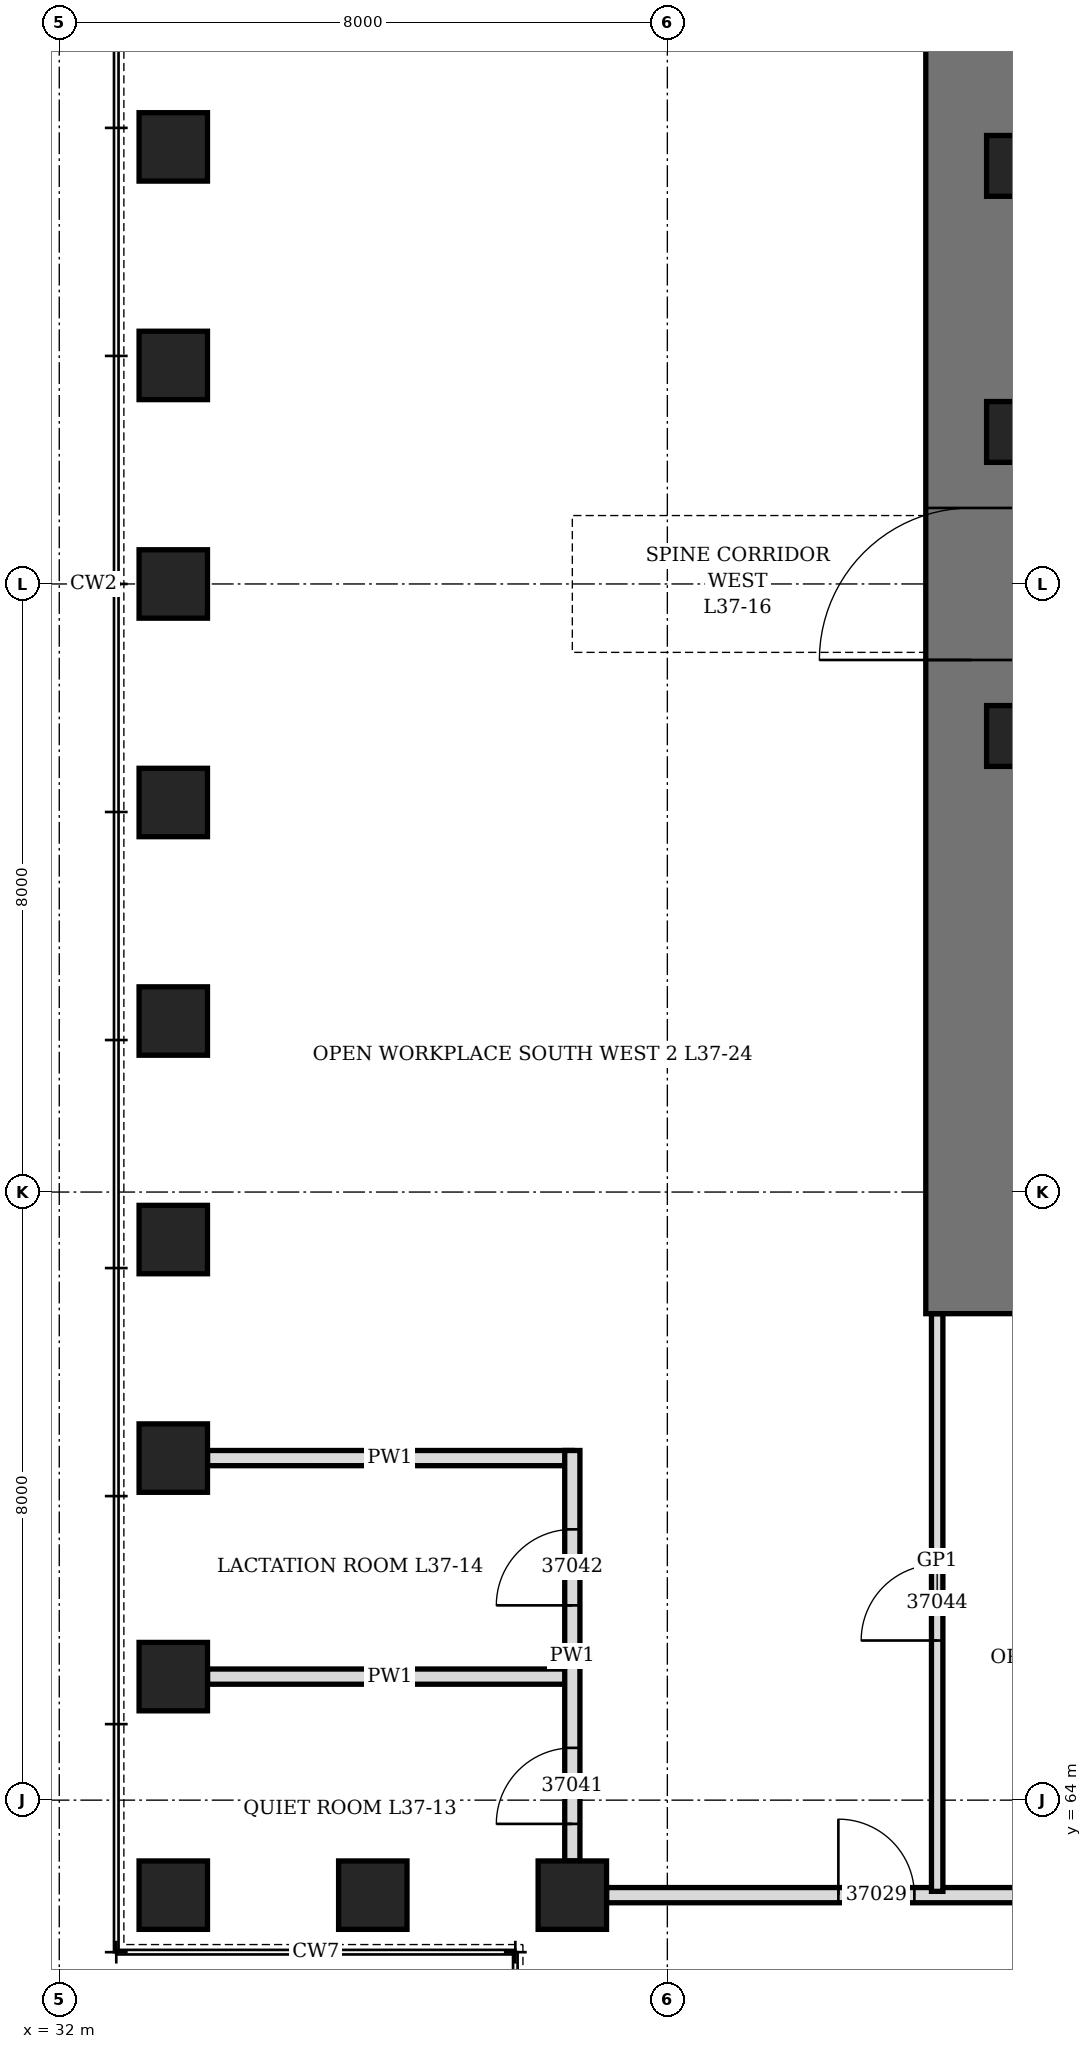
"""IFC4 building model, lengths in metres.
Left out: names, types, materials, properties, quantities, classifications, styles, units other than length and angle.
Written with IfcOpenShell. Run it as: python <this file> out.ifc"""

import sys

from ifc_helpers import new_model, si_unit, direction, frame, frame_2d, origin, origin_2d, place, context, subcontext, project, spatial, rectangle, hollow_rectangle, extrude, element, fill, save


model = new_model("IFC4")
c1 = context("Model", 3, precision=1e-05, world=origin(), true_north=direction((0.0, 1.0)))
c2 = subcontext(c1, "Body", "Model", "MODEL_VIEW")
j1 = project(units=[si_unit("LENGTHUNIT", "METRE"), si_unit("PLANEANGLEUNIT", "RADIAN")], contexts=[c1])
p1 = place(None, origin())
s1 = spatial("IfcSite", under=j1, at=p1, CompositionType="ELEMENT")
p2 = place(p1, origin())
s2 = spatial("IfcBuilding", under=s1, at=p2, CompositionType="ELEMENT")
p3 = place(p2, frame((0.0, 0.0, 166.9)))
s3 = spatial("IfcBuildingStorey", under=s2, at=p3, CompositionType="ELEMENT", Elevation=166.9)
for number, where, z_axis, x_axis in (
    (1, (33.5, 85.75, 0.0), (0.0, 0.0, 1.0), (0.0, 1.0, 0.0)),
    (2, (33.5, 82.875, 0.0), (0.0, 0.0, 1.0), (0.0, 1.0, 0.0)),
    (3, (33.5, 80.0, 0.0), (0.0, 0.0, 1.0), (0.0, 1.0, 0.0)),
    (4, (33.5, 77.125, 0.0), (0.0, 0.0, 1.0), (0.0, 1.0, 0.0)),
    (5, (33.5, 74.25, 0.0), (0.0, 0.0, 1.0), (0.0, 1.0, 0.0)),
    (6, (33.5, 71.375, 0.0), (0.0, 0.0, 1.0), (0.0, 1.0, 0.0)),
    (7, (33.5, 68.5, 0.0), (0.0, 0.0, 1.0), (0.0, 1.0, 0.0)),
    (8, (33.5, 65.625, 0.0), (0.0, 0.0, 1.0), (0.0, 1.0, 0.0)),
    (9, (33.5, 62.75, 0.0), (0.0, 0.0, 1.0), (1.0, 0.0, 0.0)),
    (10, (36.125, 62.75, 0.0), (0.0, 0.0, 1.0), (1.0, 0.0, 0.0)),
    (11, (38.75, 62.75, 0.0), (0.0, 0.0, 1.0), (0.0, 1.0, 0.0)),
):
    element("IfcColumn", number, at=place(p3, frame(where, z_axis=z_axis, x_axis=x_axis)), inside=s3, PredefinedType="COLUMN", context=c2, shape_type="SweptSolid", body=[
        extrude(hollow_rectangle(XDim=0.9, YDim=0.9, WallThickness=0.12, at=origin_2d()), origin(), (0.0, 0.0, 1.0), 4.2),
    ])
p4 = place(p3, frame((44.0, 70.4, 0.0), z_axis=(0.0, 0.0, 1.0), x_axis=(0.0, 1.0, 0.0)))
e12 = element("IfcWall", 12, at=p4, inside=s3, PredefinedType="SHEAR", context=c2, shape_type="SweptSolid", body=[
    extrude(rectangle(XDim=19.2, YDim=1.2, at=frame_2d((9.6, 0.0))), origin(), (0.0, 0.0, 1.0), 4.2),
])
p5 = place(p4, frame((8.6, 0.0, 0.0)))
e13 = element("IfcOpeningElement", 13, at=p5, cuts=e12, PredefinedType="OPENING", context=c2, shape_type="SweptSolid", body=[
    extrude(rectangle(XDim=2.0, YDim=2.4, at=frame_2d((1.0, 1.2))), frame((0.0, 0.61, 0.0), z_axis=(0.0, -1.0, 0.0), x_axis=(1.0, 0.0, 0.0)), (0.0, 0.0, 1.0), 1.22),
])
for number, where, z_axis, x_axis in (
    (14, (44.6, 78.0, 0.0), (0.0, 0.0, 1.0), (1.0, 0.0, 0.0)),
    (15, (44.6, 82.0, 0.0), (0.0, 0.0, 1.0), (1.0, 0.0, 0.0)),
    (16, (44.6, 85.5, 0.0), (0.0, 0.0, 1.0), (1.0, 0.0, 0.0)),
):
    element("IfcColumn", number, at=place(p3, frame(where, z_axis=z_axis, x_axis=x_axis)), inside=s3, PredefinedType="COLUMN", context=c2, shape_type="SweptSolid", body=[
        extrude(hollow_rectangle(XDim=0.8, YDim=0.8, WallThickness=0.1, at=origin_2d()), origin(), (0.0, 0.0, 1.0), 4.2),
    ])
for number, where, z_axis, x_axis in (
    (17, (33.95, 65.625, 0.0), (0.0, 0.0, 1.0), (1.0, 0.0, 0.0)),
    (18, (33.95, 68.5, 0.0), (0.0, 0.0, 1.0), (1.0, 0.0, 0.0)),
):
    element("IfcWall", number, at=place(p3, frame(where, z_axis=z_axis, x_axis=x_axis)), inside=s3, PredefinedType="PARTITIONING", context=c2, shape_type="SweptSolid", body=[
        extrude(rectangle(XDim=4.8, YDim=0.2, at=frame_2d((2.4, 0.0))), origin(), (0.0, 0.0, 1.0), 3.428),
    ])
p6 = place(p3, frame((39.2, 62.75, 0.0), z_axis=(0.0, 0.0, 1.0), x_axis=(1.0, 0.0, 0.0)))
e19 = element("IfcWall", 19, at=p6, inside=s3, PredefinedType="PARTITIONING", context=c2, shape_type="SweptSolid", body=[
    extrude(rectangle(XDim=25.525, YDim=0.2, at=frame_2d((12.763, 0.0))), origin(), (0.0, 0.0, 1.0), 4.04),
])
p7 = place(p6, frame((3.05, 0.0, 0.0)))
e20 = element("IfcOpeningElement", 20, at=p7, cuts=e19, PredefinedType="OPENING", context=c2, shape_type="SweptSolid", body=[
    extrude(rectangle(XDim=1.0, YDim=2.1, at=frame_2d((0.5, 1.05))), frame((0.0, 0.11, 0.0), z_axis=(0.0, -1.0, 0.0), x_axis=(1.0, 0.0, 0.0)), (0.0, 0.0, 1.0), 0.22),
])
p8 = place(p6, frame((11.988, 0.0, 0.0)))
e21 = element("IfcOpeningElement", 21, at=p8, cuts=e19, PredefinedType="OPENING", context=c2, shape_type="SweptSolid", body=[
    extrude(rectangle(XDim=1.0, YDim=2.1, at=frame_2d((0.5, 1.05))), frame((0.0, 0.11, 0.0), z_axis=(0.0, -1.0, 0.0), x_axis=(1.0, 0.0, 0.0)), (0.0, 0.0, 1.0), 0.22),
])
p9 = place(p6, frame((20.613, 0.0, 0.0)))
e22 = element("IfcOpeningElement", 22, at=p9, cuts=e19, PredefinedType="OPENING", context=c2, shape_type="SweptSolid", body=[
    extrude(rectangle(XDim=1.0, YDim=2.1, at=frame_2d((0.5, 1.05))), frame((0.0, 0.11, 0.0), z_axis=(0.0, -1.0, 0.0), x_axis=(1.0, 0.0, 0.0)), (0.0, 0.0, 1.0), 0.22),
])
p10 = place(p3, frame((38.75, 63.2, 0.0), z_axis=(0.0, 0.0, 1.0), x_axis=(0.0, 1.0, 0.0)))
e23 = element("IfcWall", 23, at=p10, inside=s3, PredefinedType="PARTITIONING", context=c2, shape_type="SweptSolid", body=[
    extrude(rectangle(XDim=5.4, YDim=0.2, at=frame_2d((2.7, 0.0))), origin(), (0.0, 0.0, 1.0), 4.04),
])
p11 = place(p10, frame((0.488, 0.0, 0.0)))
e24 = element("IfcOpeningElement", 24, at=p11, cuts=e23, PredefinedType="OPENING", context=c2, shape_type="SweptSolid", body=[
    extrude(rectangle(XDim=1.0, YDim=2.1, at=frame_2d((0.5, 1.05))), frame((0.0, 0.11, 0.0), z_axis=(0.0, -1.0, 0.0), x_axis=(1.0, 0.0, 0.0)), (0.0, 0.0, 1.0), 0.22),
])
p12 = place(p10, frame((3.363, 0.0, 0.0)))
e25 = element("IfcOpeningElement", 25, at=p12, cuts=e23, PredefinedType="OPENING", context=c2, shape_type="SweptSolid", body=[
    extrude(rectangle(XDim=1.0, YDim=2.1, at=frame_2d((0.5, 1.05))), frame((0.0, 0.11, 0.0), z_axis=(0.0, -1.0, 0.0), x_axis=(1.0, 0.0, 0.0)), (0.0, 0.0, 1.0), 0.22),
])
p13 = place(p3, frame((43.55, 62.8, 0.0), z_axis=(0.0, 0.0, 1.0), x_axis=(0.0, 1.0, 0.0)))
e26 = element("IfcWall", 26, at=p13, inside=s3, PredefinedType="PARTITIONING", context=c2, shape_type="SweptSolid", body=[
    extrude(rectangle(XDim=7.6, YDim=0.15, at=frame_2d((3.8, 0.0))), origin(), (0.0, 0.0, 1.0), 4.04),
])
p14 = place(p13, frame((3.3, 0.0, 0.0)))
e27 = element("IfcOpeningElement", 27, at=p14, cuts=e26, PredefinedType="OPENING", context=c2, shape_type="SweptSolid", body=[
    extrude(rectangle(XDim=1.0, YDim=2.4, at=frame_2d((0.5, 1.2))), frame((0.0, 0.085, 0.0), z_axis=(0.0, -1.0, 0.0), x_axis=(1.0, 0.0, 0.0)), (0.0, 0.0, 1.0), 0.17),
])
p15 = place(p5, origin())
e28 = element("IfcDoor", 28, at=p15, inside=s3, OperationType="DOUBLE_DOOR_SINGLE_SWING", PredefinedType="DOOR", context=c2, shape_type="SweptSolid", body=[
    extrude(rectangle(XDim=2.0, YDim=2.4, at=frame_2d((1.0, 1.2))), frame((0.0, 0.35, 0.0), z_axis=(0.0, -1.0, 0.0), x_axis=(1.0, 0.0, 0.0)), (0.0, 0.0, 1.0), 0.7),
])
fill(e13, e28)
p16 = place(p7, origin())
e29 = element("IfcDoor", 29, at=p16, inside=s3, OperationType="SINGLE_SWING_LEFT", PredefinedType="DOOR", context=c2, shape_type="SweptSolid", body=[
    extrude(rectangle(XDim=1.0, YDim=2.1, at=frame_2d((0.5, 1.05))), frame((0.0, 0.1, 0.0), z_axis=(0.0, -1.0, 0.0), x_axis=(1.0, 0.0, 0.0)), (0.0, 0.0, 1.0), 0.199),
])
fill(e20, e29)
p17 = place(p11, origin())
e30 = element("IfcDoor", 30, at=p17, inside=s3, OperationType="SINGLE_SWING_LEFT", PredefinedType="DOOR", context=c2, shape_type="SweptSolid", body=[
    extrude(rectangle(XDim=1.0, YDim=2.1, at=frame_2d((0.5, 1.05))), frame((0.0, 0.1, 0.0), z_axis=(0.0, -1.0, 0.0), x_axis=(1.0, 0.0, 0.0)), (0.0, 0.0, 1.0), 0.199),
])
fill(e24, e30)
p18 = place(p12, origin())
e31 = element("IfcDoor", 31, at=p18, inside=s3, OperationType="SINGLE_SWING_LEFT", PredefinedType="DOOR", context=c2, shape_type="SweptSolid", body=[
    extrude(rectangle(XDim=1.0, YDim=2.1, at=frame_2d((0.5, 1.05))), frame((0.0, 0.1, 0.0), z_axis=(0.0, -1.0, 0.0), x_axis=(1.0, 0.0, 0.0)), (0.0, 0.0, 1.0), 0.199),
])
fill(e25, e31)
p19 = place(p14, origin())
e32 = element("IfcDoor", 32, at=p19, inside=s3, OperationType="SINGLE_SWING_RIGHT", PredefinedType="DOOR", context=c2, shape_type="SweptSolid", body=[
    extrude(rectangle(XDim=1.0, YDim=2.4, at=frame_2d((0.5, 1.2))), frame((0.0, 0.075, 0.0), z_axis=(0.0, -1.0, 0.0), x_axis=(1.0, 0.0, 0.0)), (0.0, 0.0, 1.0), 0.149),
])
fill(e27, e32)
save(model, sys.argv[1])
